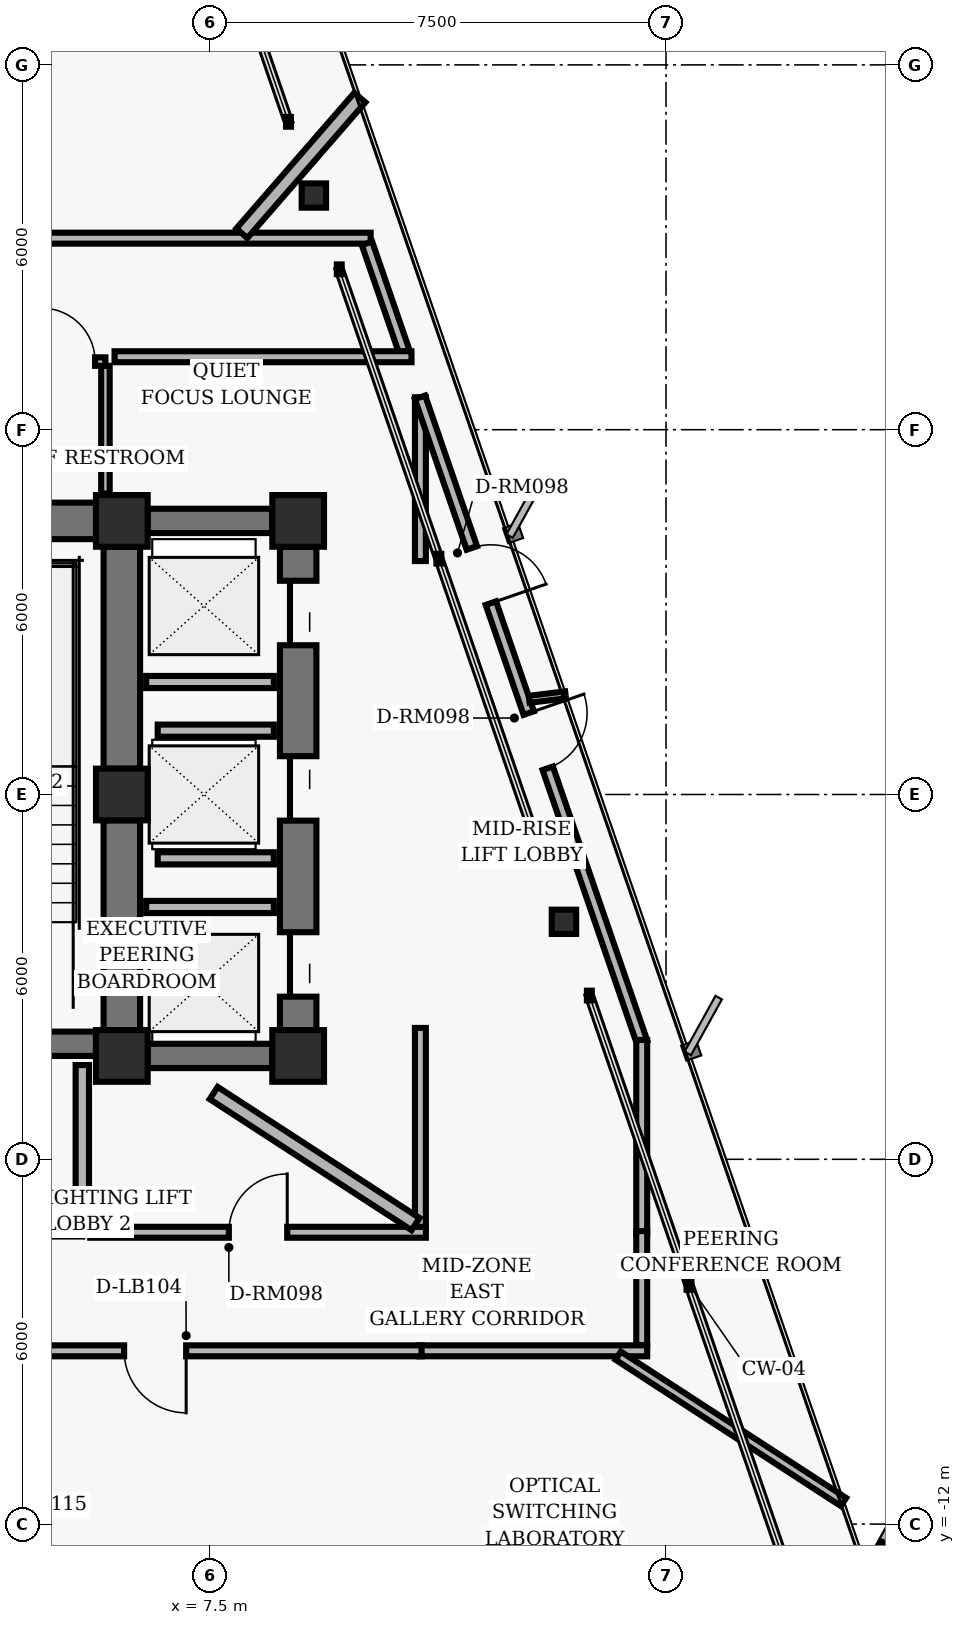
"""IFC4 building model, lengths in metres.
Left out: names, types, materials, properties, quantities, classifications, styles, units other than length and angle.
Written with IfcOpenShell. Run it as: python <this file> out.ifc"""

import sys

from ifc_helpers import new_model, si_unit, direction, frame, frame_2d, origin, origin_2d, place, context, subcontext, project, spatial, rectangle, hollow_rectangle, i_section, extrude, element, fill, save


model = new_model("IFC4")
c1 = context("Model", 3, precision=1e-05, world=origin(), true_north=direction((0.0, 1.0)))
c2 = subcontext(c1, "Body", "Model", "MODEL_VIEW")
j1 = project(units=[si_unit("LENGTHUNIT", "METRE"), si_unit("PLANEANGLEUNIT", "RADIAN")], contexts=[c1])
p1 = place(None, origin())
s1 = spatial("IfcSite", under=j1, at=p1, CompositionType="ELEMENT")
p2 = place(p1, origin())
s2 = spatial("IfcBuilding", under=s1, at=p2, CompositionType="ELEMENT")
p3 = place(p2, frame((0.0, 0.0, 156.32)))
s3 = spatial("IfcBuildingStorey", under=s2, at=p3, CompositionType="ELEMENT", Elevation=156.32)
for number, where, z_axis, x_axis in (
    (1, (6.05, 4.5, 0.0), (0.0, 0.0, 1.0), (1.0, 0.0, 0.0)),
    (2, (6.05, 0.0, 0.0), (0.0, 0.0, 1.0), (1.0, 0.0, 0.0)),
    (3, (6.05, -4.3, 0.0), (0.0, 0.0, 1.0), (1.0, 0.0, 0.0)),
    (4, (8.95, 4.5, 0.0), (0.0, 0.0, 1.0), (1.0, 0.0, 0.0)),
    (5, (8.95, -4.3, 0.0), (0.0, 0.0, 1.0), (1.0, 0.0, 0.0)),
):
    element("IfcColumn", number, at=place(p3, frame(where, z_axis=z_axis, x_axis=x_axis)), inside=s3, PredefinedType="COLUMN", context=c2, shape_type="SweptSolid", body=[
        extrude(hollow_rectangle(XDim=0.85, YDim=0.85, WallThickness=0.055, InnerFilletRadius=0.02, OuterFilletRadius=0.04, at=origin_2d()), origin(), (0.0, 0.0, 1.0), 3.04),
    ])
p4 = place(p3, frame((6.05, 0.425, 0.0), z_axis=(0.0, 0.0, 1.0), x_axis=(0.0, 1.0, 0.0)))
e6 = element("IfcWall", 6, at=p4, inside=s3, PredefinedType="SHEAR", context=c2, shape_type="SweptSolid", body=[
    extrude(rectangle(XDim=3.65, YDim=0.6, at=frame_2d((1.825, 0.0))), origin(), (0.0, 0.0, 1.0), 2.788),
])
p5 = place(p3, frame((6.05, -3.875, 0.0), z_axis=(0.0, 0.0, 1.0), x_axis=(0.0, 1.0, 0.0)))
e7 = element("IfcWall", 7, at=p5, inside=s3, PredefinedType="SHEAR", context=c2, shape_type="SweptSolid", body=[
    extrude(rectangle(XDim=3.45, YDim=0.6, at=frame_2d((1.725, 0.0))), origin(), (0.0, 0.0, 1.0), 2.788),
])
p6 = place(p3, frame((-5.625, -4.1, 0.0), z_axis=(0.0, 0.0, 1.0), x_axis=(1.0, 0.0, 0.0)))
e8 = element("IfcWall", 8, at=p6, inside=s3, PredefinedType="SHEAR", context=c2, shape_type="SweptSolid", body=[
    extrude(rectangle(XDim=11.25, YDim=0.4, at=frame_2d((5.625, 0.0))), origin(), (0.0, 0.0, 1.0), 2.788),
])
p7 = place(p6, frame((1.355, 0.0, 0.0)))
e9 = element("IfcOpeningElement", 9, at=p7, cuts=e8, PredefinedType="OPENING", context=c2, shape_type="SweptSolid", body=[
    extrude(rectangle(XDim=1.1, YDim=2.04, at=frame_2d((0.55, 1.02))), frame((0.0, 0.21, 0.0), z_axis=(0.0, -1.0, 0.0), x_axis=(1.0, 0.0, 0.0)), (0.0, 0.0, 1.0), 0.42),
])
p8 = place(p6, frame((8.795, 0.0, 0.0)))
e10 = element("IfcOpeningElement", 10, at=p8, cuts=e8, PredefinedType="OPENING", context=c2, shape_type="SweptSolid", body=[
    extrude(rectangle(XDim=1.1, YDim=2.04, at=frame_2d((0.55, 1.02))), frame((0.0, 0.21, 0.0), z_axis=(0.0, -1.0, 0.0), x_axis=(1.0, 0.0, 0.0)), (0.0, 0.0, 1.0), 0.42),
])
p9 = place(p6, frame((4.095, 0.0, 0.0)))
e11 = element("IfcOpeningElement", 11, at=p9, cuts=e8, PredefinedType="OPENING", context=c2, shape_type="SweptSolid", body=[
    extrude(rectangle(XDim=1.06, YDim=2.04, at=frame_2d((0.53, 1.02))), frame((0.0, 0.21, 0.0), z_axis=(0.0, -1.0, 0.0), x_axis=(1.0, 0.0, 0.0)), (0.0, 0.0, 1.0), 0.42),
])
p10 = place(p6, frame((6.095, 0.0, 0.0)))
e12 = element("IfcOpeningElement", 12, at=p10, cuts=e8, PredefinedType="OPENING", context=c2, shape_type="SweptSolid", body=[
    extrude(rectangle(XDim=1.06, YDim=2.04, at=frame_2d((0.53, 1.02))), frame((0.0, 0.21, 0.0), z_axis=(0.0, -1.0, 0.0), x_axis=(1.0, 0.0, 0.0)), (0.0, 0.0, 1.0), 0.42),
])
p11 = place(p3, frame((2.05, 4.5, 0.0), z_axis=(0.0, 0.0, 1.0), x_axis=(1.0, 0.0, 0.0)))
e13 = element("IfcWall", 13, at=p11, inside=s3, PredefinedType="SHEAR", context=c2, shape_type="SweptSolid", body=[
    extrude(rectangle(XDim=3.575, YDim=0.6, at=frame_2d((1.788, 0.0))), origin(), (0.0, 0.0, 1.0), 2.788),
])
p12 = place(p3, frame((8.95, -3.875, 0.0), z_axis=(0.0, 0.0, 1.0), x_axis=(0.0, 1.0, 0.0)))
e14 = element("IfcWall", 14, at=p12, inside=s3, PredefinedType="SHEAR", context=c2, shape_type="SweptSolid", body=[
    extrude(rectangle(XDim=7.95, YDim=0.6, at=frame_2d((3.975, 0.0))), origin(), (0.0, 0.0, 1.0), 2.788),
])
p13 = place(p12, frame((0.55, 0.0, 0.0)))
e15 = element("IfcOpeningElement", 15, at=p13, cuts=e14, PredefinedType="OPENING", context=c2, shape_type="SweptSolid", body=[
    extrude(rectangle(XDim=1.06, YDim=2.04, at=frame_2d((0.53, 1.02))), frame((0.0, 0.31, 0.0), z_axis=(0.0, -1.0, 0.0), x_axis=(1.0, 0.0, 0.0)), (0.0, 0.0, 1.0), 0.62),
])
p14 = place(p12, frame((3.445, 0.0, 0.0)))
e16 = element("IfcOpeningElement", 16, at=p14, cuts=e14, PredefinedType="OPENING", context=c2, shape_type="SweptSolid", body=[
    extrude(rectangle(XDim=1.06, YDim=2.04, at=frame_2d((0.53, 1.02))), frame((0.0, 0.31, 0.0), z_axis=(0.0, -1.0, 0.0), x_axis=(1.0, 0.0, 0.0)), (0.0, 0.0, 1.0), 0.62),
])
p15 = place(p12, frame((6.33, 0.0, 0.0)))
e17 = element("IfcOpeningElement", 17, at=p15, cuts=e14, PredefinedType="OPENING", context=c2, shape_type="SweptSolid", body=[
    extrude(rectangle(XDim=1.06, YDim=2.04, at=frame_2d((0.53, 1.02))), frame((0.0, 0.31, 0.0), z_axis=(0.0, -1.0, 0.0), x_axis=(1.0, 0.0, 0.0)), (0.0, 0.0, 1.0), 0.62),
])
for number, where, z_axis, x_axis in (
    (18, (6.475, 4.5, 0.0), (0.0, 0.0, 1.0), (1.0, 0.0, 0.0)),
    (19, (6.475, -4.3, 0.0), (0.0, 0.0, 1.0), (1.0, 0.0, 0.0)),
):
    element("IfcWall", number, at=place(p3, frame(where, z_axis=z_axis, x_axis=x_axis)), inside=s3, PredefinedType="SHEAR", context=c2, shape_type="SweptSolid", body=[
        extrude(rectangle(XDim=2.05, YDim=0.4, at=frame_2d((1.025, 0.0))), origin(), (0.0, 0.0, 1.0), 2.788),
    ])
for number, where, z_axis, x_axis in (
    (20, (13.321, -2.094, 0.0), (0.0, 0.0, 1.0), (1.0, 0.0, 0.0)),
    (21, (9.208, 9.851, 0.0), (0.0, 0.0, 1.0), (1.0, 0.0, 0.0)),
):
    element("IfcColumn", number, at=place(p3, frame(where, z_axis=z_axis, x_axis=x_axis)), inside=s3, PredefinedType="COLUMN", context=c2, shape_type="SweptSolid", body=[
        extrude(i_section(OverallWidth=0.401, OverallDepth=0.399, WebThickness=0.025, FlangeThickness=0.04, FilletRadius=0.018, at=origin_2d()), origin(), (0.0, 0.0, 1.0), 3.04),
    ])
p16 = place(p3, frame((5.4, -7.16, 0.0), z_axis=(0.0, 0.0, 1.0), x_axis=(0.0, 1.0, 0.0)))
e22 = element("IfcWall", 22, at=p16, inside=s3, PredefinedType="PARTITIONING", context=c2, shape_type="SweptSolid", body=[
    extrude(rectangle(XDim=2.71, YDim=0.22, at=frame_2d((1.355, 0.0))), origin(), (0.0, 0.0, 1.0), 2.763),
])
p17 = place(p3, frame((0.0, -7.16, 0.0), z_axis=(0.0, 0.0, 1.0), x_axis=(1.0, 0.0, 0.0)))
e23 = element("IfcWall", 23, at=p17, inside=s3, PredefinedType="PARTITIONING", context=c2, shape_type="SweptSolid", body=[
    extrude(rectangle(XDim=5.4, YDim=0.22, at=frame_2d((2.7, 0.0))), origin(), (0.0, 0.0, 1.0), 2.33),
])
p18 = place(p17, frame((2.05, 0.0, 0.0)))
e24 = element("IfcOpeningElement", 24, at=p18, cuts=e23, PredefinedType="OPENING", context=c2, shape_type="SweptSolid", body=[
    extrude(rectangle(XDim=1.12, YDim=2.02, at=frame_2d((0.56, 1.01))), frame((0.0, 0.12, 0.0), z_axis=(0.0, -1.0, 0.0), x_axis=(1.0, 0.0, 0.0)), (0.0, 0.0, 1.0), 0.24),
])
p19 = place(p3, frame((5.78, 4.95, 0.0), z_axis=(0.0, 0.0, 1.0), x_axis=(0.0, 1.0, 0.0)))
e25 = element("IfcWall", 25, at=p19, inside=s3, PredefinedType="PARTITIONING", context=c2, shape_type="SweptSolid", body=[
    extrude(rectangle(XDim=2.1, YDim=0.14, at=frame_2d((1.05, 0.0))), origin(), (0.0, 0.0, 1.0), 2.763),
])
p20 = place(p3, frame((4.56, 7.12, 0.0), z_axis=(0.0, 0.0, 1.0), x_axis=(1.0, 0.0, 0.0)))
e26 = element("IfcWall", 26, at=p20, inside=s3, PredefinedType="PARTITIONING", context=c2, shape_type="SweptSolid", body=[
    extrude(rectangle(XDim=1.22, YDim=0.14, at=frame_2d((0.61, 0.0))), origin(), (0.0, 0.0, 1.0), 2.763),
])
p21 = place(p20, frame((0.17, 0.0, 0.0)))
e27 = element("IfcOpeningElement", 27, at=p21, cuts=e26, PredefinedType="OPENING", context=c2, shape_type="SweptSolid", body=[
    extrude(rectangle(XDim=0.88, YDim=2.02, at=frame_2d((0.44, 1.01))), frame((0.0, 0.08, 0.0), z_axis=(0.0, -1.0, 0.0), x_axis=(1.0, 0.0, 0.0)), (0.0, 0.0, 1.0), 0.16),
])
for number, where, z_axis, x_axis in (
    (28, (6.45, -1.85, 0.0), (0.0, 0.0, 1.0), (1.0, 0.0, 0.0)),
    (29, (6.45, 1.85, 0.0), (0.0, 0.0, 1.0), (1.0, 0.0, 0.0)),
):
    element("IfcWall", number, at=place(p3, frame(where, z_axis=z_axis, x_axis=x_axis)), inside=s3, PredefinedType="PARTITIONING", context=c2, shape_type="SweptSolid", body=[
        extrude(rectangle(XDim=2.1, YDim=0.2, at=frame_2d((1.05, 0.0))), origin(), (0.0, 0.0, 1.0), 2.763),
    ])
for number, where, z_axis, x_axis in (
    (30, (6.64, -1.05, 0.0), (0.0, 0.0, 1.0), (1.0, 0.0, 0.0)),
    (31, (6.64, 1.05, 0.0), (0.0, 0.0, 1.0), (1.0, 0.0, 0.0)),
):
    element("IfcWall", number, at=place(p3, frame(where, z_axis=z_axis, x_axis=x_axis)), inside=s3, PredefinedType="PARTITIONING", context=c2, shape_type="SweptSolid", body=[
        extrude(rectangle(XDim=1.91, YDim=0.2, at=frame_2d((0.955, 0.0))), origin(), (0.0, 0.0, 1.0), 2.763),
    ])
p22 = place(p3, frame((-6.52, 9.15, 0.0), z_axis=(0.0, 0.0, 1.0), x_axis=(1.0, 0.0, 0.0)))
e32 = element("IfcWall", 32, at=p22, inside=s3, PredefinedType="PARTITIONING", context=c2, shape_type="SweptSolid", body=[
    extrude(rectangle(XDim=16.662, YDim=0.18, at=frame_2d((8.331, 0.0))), origin(), (0.0, 0.0, 1.0), 2.763),
])
p23 = place(p22, frame((9.985, 0.0, 0.0)))
e33 = element("IfcOpeningElement", 33, at=p23, cuts=e32, PredefinedType="OPENING", context=c2, shape_type="SweptSolid", body=[
    extrude(rectangle(XDim=0.96, YDim=2.02, at=frame_2d((0.48, 1.01))), frame((0.0, 0.1, 0.0), z_axis=(0.0, -1.0, 0.0), x_axis=(1.0, 0.0, 0.0)), (0.0, 0.0, 1.0), 0.2),
])
p24 = place(p22, frame((2.719, 0.0, 0.0)))
e34 = element("IfcOpeningElement", 34, at=p24, cuts=e32, PredefinedType="OPENING", context=c2, shape_type="SweptSolid", body=[
    extrude(rectangle(XDim=1.18, YDim=2.02, at=frame_2d((0.59, 1.01))), frame((0.0, 0.1, 0.0), z_axis=(0.0, -1.0, 0.0), x_axis=(1.0, 0.0, 0.0)), (0.0, 0.0, 1.0), 0.2),
])
p25 = place(p3, frame((10.082, 9.065, 0.0), z_axis=(0.0, 0.0, 1.0), x_axis=(0.325550958337, -0.945524496524, 0.0)))
e35 = element("IfcWall", 35, at=p25, inside=s3, PredefinedType="PARTITIONING", context=c2, shape_type="SweptSolid", body=[
    extrude(rectangle(XDim=1.882, YDim=0.18, at=frame_2d((0.941, 0.0))), origin(), (0.0, 0.0, 1.0), 2.763),
])
p26 = place(p3, frame((10.814, 7.2, 0.0), z_axis=(0.0, 0.0, 1.0), x_axis=(-1.0, 0.0, 0.0)))
e36 = element("IfcWall", 36, at=p26, inside=s3, PredefinedType="PARTITIONING", context=c2, shape_type="SweptSolid", body=[
    extrude(rectangle(XDim=4.884, YDim=0.18, at=frame_2d((2.442, 0.0))), origin(), (0.0, 0.0, 1.0), 2.763),
])
p27 = place(p3, frame((5.53, -7.2, 0.0), z_axis=(0.0, 0.0, 1.0), x_axis=(1.0, 0.0, 0.0)))
e37 = element("IfcWall", 37, at=p27, inside=s3, PredefinedType="PARTITIONING", context=c2, shape_type="SweptSolid", body=[
    extrude(rectangle(XDim=5.52, YDim=0.18, at=frame_2d((2.76, 0.0))), origin(), (0.0, 0.0, 1.0), 2.33),
])
p28 = place(p27, frame((2.28, 0.0, 0.0)))
e38 = element("IfcOpeningElement", 38, at=p28, cuts=e37, PredefinedType="OPENING", context=c2, shape_type="SweptSolid", body=[
    extrude(rectangle(XDim=0.96, YDim=2.02, at=frame_2d((0.48, 1.01))), frame((0.0, 0.1, 0.0), z_axis=(0.0, -1.0, 0.0), x_axis=(1.0, 0.0, 0.0)), (0.0, 0.0, 1.0), 0.2),
])
p29 = place(p3, frame((10.96, -7.11, 0.0), z_axis=(0.0, 0.0, 1.0), x_axis=(0.0, 1.0, 0.0)))
e39 = element("IfcWall", 39, at=p29, inside=s3, PredefinedType="PARTITIONING", context=c2, shape_type="SweptSolid", body=[
    extrude(rectangle(XDim=3.271, YDim=0.18, at=frame_2d((1.635, 0.0))), origin(), (0.0, 0.0, 1.0), 2.763),
])
p30 = place(p3, frame((10.96, 3.84, 0.0), z_axis=(0.0, 0.0, 1.0), x_axis=(0.0, 1.0, 0.0)))
e40 = element("IfcWall", 40, at=p30, inside=s3, PredefinedType="PARTITIONING", context=c2, shape_type="SweptSolid", body=[
    extrude(rectangle(XDim=2.694, YDim=0.18, at=frame_2d((1.347, 0.0))), origin(), (0.0, 0.0, 1.0), 2.33),
])
p31 = place(p3, frame((10.954, 6.533, 0.0), z_axis=(0.0, 0.0, 1.0), x_axis=(0.325553439946, -0.945523642084, 0.0)))
e41 = element("IfcWall", 41, at=p31, inside=s3, PredefinedType="PARTITIONING", context=c2, shape_type="SweptSolid", body=[
    extrude(rectangle(XDim=11.22, YDim=0.18, at=frame_2d((5.61, 0.0))), origin(), (0.0, 0.0, 1.0), 2.763),
])
p32 = place(p31, frame((5.493, 0.0, 0.0)))
e42 = element("IfcOpeningElement", 42, at=p32, cuts=e41, PredefinedType="OPENING", context=c2, shape_type="SweptSolid", body=[
    extrude(rectangle(XDim=0.96, YDim=2.02, at=frame_2d((0.48, 1.01))), frame((0.0, 0.1, 0.0), z_axis=(0.0, -1.0, 0.0), x_axis=(1.0, 0.0, 0.0)), (0.0, 0.0, 1.0), 0.2),
])
p33 = place(p31, frame((2.621, 0.0, 0.0)))
e43 = element("IfcOpeningElement", 43, at=p33, cuts=e41, PredefinedType="OPENING", context=c2, shape_type="SweptSolid", body=[
    extrude(rectangle(XDim=0.96, YDim=2.02, at=frame_2d((0.48, 1.01))), frame((0.0, 0.1, 0.0), z_axis=(0.0, -1.0, 0.0), x_axis=(1.0, 0.0, 0.0)), (0.0, 0.0, 1.0), 0.2),
])
p34 = place(p3, frame((14.6, -4.038, 0.0), z_axis=(0.0, 0.0, 1.0), x_axis=(0.0, -1.0, 0.0)))
e44 = element("IfcWall", 44, at=p34, inside=s3, PredefinedType="PARTITIONING", context=c2, shape_type="SweptSolid", body=[
    extrude(rectangle(XDim=3.182, YDim=0.18, at=frame_2d((1.591, 0.0))), origin(), (0.0, 0.0, 1.0), 2.763),
])
p35 = place(p3, frame((14.6, -7.18, 0.0), z_axis=(0.0, 0.0, 1.0), x_axis=(0.0, -1.0, 0.0)))
e45 = element("IfcWall", 45, at=p35, inside=s3, PredefinedType="PARTITIONING", context=c2, shape_type="SweptSolid", body=[
    extrude(rectangle(XDim=1.88, YDim=0.18, at=frame_2d((0.94, 0.0))), origin(), (0.0, 0.0, 1.0), 2.763),
])
p36 = place(p3, frame((14.69, -9.15, 0.0), z_axis=(0.0, 0.0, 1.0), x_axis=(-1.0, 0.0, 0.0)))
e46 = element("IfcWall", 46, at=p36, inside=s3, PredefinedType="PARTITIONING", context=c2, shape_type="SweptSolid", body=[
    extrude(rectangle(XDim=3.75, YDim=0.18, at=frame_2d((1.875, 0.0))), origin(), (0.0, 0.0, 1.0), 2.763),
])
p37 = place(p3, frame((10.98, -9.15, 0.0), z_axis=(0.0, 0.0, 1.0), x_axis=(-1.0, 0.0, 0.0)))
e47 = element("IfcWall", 47, at=p37, inside=s3, PredefinedType="PARTITIONING", context=c2, shape_type="SweptSolid", body=[
    extrude(rectangle(XDim=17.5, YDim=0.18, at=frame_2d((8.75, 0.0))), origin(), (0.0, 0.0, 1.0), 2.33),
])
p38 = place(p37, frame((11.417, 0.0, 0.0)))
e48 = element("IfcOpeningElement", 48, at=p38, cuts=e47, PredefinedType="OPENING", context=c2, shape_type="SweptSolid", body=[
    extrude(rectangle(XDim=0.96, YDim=2.02, at=frame_2d((0.48, 1.01))), frame((0.0, 0.1, 0.0), z_axis=(0.0, -1.0, 0.0), x_axis=(1.0, 0.0, 0.0)), (0.0, 0.0, 1.0), 0.2),
])
p39 = place(p37, frame((3.872, 0.0, 0.0)))
e49 = element("IfcOpeningElement", 49, at=p39, cuts=e47, PredefinedType="OPENING", context=c2, shape_type="SweptSolid", body=[
    extrude(rectangle(XDim=1.02, YDim=2.02, at=frame_2d((0.51, 1.01))), frame((0.0, 0.1, 0.0), z_axis=(0.0, -1.0, 0.0), x_axis=(1.0, 0.0, 0.0)), (0.0, 0.0, 1.0), 0.2),
])
p40 = place(p3, frame((7.561, -4.91, 0.0), z_axis=(0.0, 0.0, 1.0), x_axis=(0.838633829817, -0.544695602595, 0.0)))
e50 = element("IfcWall", 50, at=p40, inside=s3, PredefinedType="PARTITIONING", context=c2, shape_type="SweptSolid", body=[
    extrude(rectangle(XDim=3.958, YDim=0.24, at=frame_2d((1.979, 0.0))), origin(), (0.0, 0.0, 1.0), 2.132),
])
p41 = place(p3, frame((14.213, -9.23, 0.0), z_axis=(0.0, 0.0, 1.0), x_axis=(0.83867205822, -0.544636740187, 0.0)))
e51 = element("IfcWall", 51, at=p41, inside=s3, PredefinedType="PARTITIONING", context=c2, shape_type="SweptSolid", body=[
    extrude(rectangle(XDim=4.418, YDim=0.16, at=frame_2d((2.209, 0.0))), origin(), (0.0, 0.0, 1.0), 2.763),
])
p42 = place(p3, frame((12.749, 1.565, 0.0), z_axis=(0.0, 0.0, 1.0), x_axis=(0.992500437265, 0.122241081588, 0.0)))
e52 = element("IfcWall", 52, at=p42, inside=s3, PredefinedType="MOVABLE", context=c2, shape_type="SweptSolid", body=[
    extrude(rectangle(XDim=0.603, YDim=0.115, at=frame_2d((0.302, 0.0))), origin(), (0.0, 0.0, 1.0), 2.763),
])
p43 = place(p3, frame((8.023, 9.23, 0.0), z_axis=(0.0, 0.0, 1.0), x_axis=(0.656082692906, 0.754689008844, 0.0)))
e53 = element("IfcWall", 53, at=p43, inside=s3, PredefinedType="PARTITIONING", context=c2, shape_type="SweptSolid", body=[
    extrude(rectangle(XDim=2.959, YDim=0.24, at=frame_2d((1.479, 0.0))), origin(), (0.0, 0.0, 1.0), 2.763),
])
p44 = place(p21, origin())
e54 = element("IfcDoor", 54, at=p44, inside=s3, OperationType="SINGLE_SWING_LEFT", PredefinedType="DOOR", context=c2, shape_type="SweptSolid", body=[
    extrude(rectangle(XDim=0.88, YDim=2.02, at=frame_2d((0.44, 1.01))), frame((0.0, 0.025, 0.0), z_axis=(0.0, -1.0, 0.0), x_axis=(1.0, 0.0, 0.0)), (0.0, 0.0, 1.0), 0.05),
])
fill(e27, e54)
p45 = place(p13, origin())
e55 = element("IfcDoor", 55, at=p45, inside=s3, OperationType="SLIDING_TO_LEFT", PredefinedType="DOOR", context=c2, shape_type="SweptSolid", body=[
    extrude(rectangle(XDim=1.06, YDim=2.04, at=frame_2d((0.53, 1.02))), frame((0.0, 0.025, 0.0), z_axis=(0.0, -1.0, 0.0), x_axis=(1.0, 0.0, 0.0)), (0.0, 0.0, 1.0), 0.05),
])
fill(e15, e55)
p46 = place(p14, origin())
e56 = element("IfcDoor", 56, at=p46, inside=s3, OperationType="SLIDING_TO_RIGHT", PredefinedType="DOOR", context=c2, shape_type="SweptSolid", body=[
    extrude(rectangle(XDim=1.06, YDim=2.04, at=frame_2d((0.53, 1.02))), frame((0.0, 0.025, 0.0), z_axis=(0.0, -1.0, 0.0), x_axis=(1.0, 0.0, 0.0)), (0.0, 0.0, 1.0), 0.05),
])
fill(e16, e56)
p47 = place(p15, origin())
e57 = element("IfcDoor", 57, at=p47, inside=s3, OperationType="SLIDING_TO_LEFT", PredefinedType="DOOR", context=c2, shape_type="SweptSolid", body=[
    extrude(rectangle(XDim=1.06, YDim=2.04, at=frame_2d((0.53, 1.02))), frame((0.0, 0.025, 0.0), z_axis=(0.0, -1.0, 0.0), x_axis=(1.0, 0.0, 0.0)), (0.0, 0.0, 1.0), 0.05),
])
fill(e17, e57)
p48 = place(p39, origin())
e58 = element("IfcDoor", 58, at=p48, inside=s3, OperationType="SINGLE_SWING_LEFT", PredefinedType="DOOR", context=c2, shape_type="SweptSolid", body=[
    extrude(rectangle(XDim=1.02, YDim=2.02, at=frame_2d((0.51, 1.01))), frame((0.0, 0.025, 0.0), z_axis=(0.0, -1.0, 0.0), x_axis=(1.0, 0.0, 0.0)), (0.0, 0.0, 1.0), 0.05),
])
fill(e49, e58)
p49 = place(p28, origin())
e59 = element("IfcDoor", 59, at=p49, inside=s3, OperationType="SINGLE_SWING_RIGHT", PredefinedType="DOOR", context=c2, shape_type="SweptSolid", body=[
    extrude(rectangle(XDim=0.96, YDim=2.02, at=frame_2d((0.48, 1.01))), frame((0.0, 0.025, 0.0), z_axis=(0.0, -1.0, 0.0), x_axis=(1.0, 0.0, 0.0)), (0.0, 0.0, 1.0), 0.05),
])
fill(e38, e59)
p50 = place(p32, origin())
e60 = element("IfcDoor", 60, at=p50, inside=s3, OperationType="SINGLE_SWING_LEFT", PredefinedType="DOOR", context=c2, shape_type="SweptSolid", body=[
    extrude(rectangle(XDim=0.96, YDim=2.02, at=frame_2d((0.48, 1.01))), frame((0.0, 0.025, 0.0), z_axis=(0.0, -1.0, 0.0), x_axis=(1.0, 0.0, 0.0)), (0.0, 0.0, 1.0), 0.05),
])
fill(e42, e60)
p51 = place(p33, origin())
e61 = element("IfcDoor", 61, at=p51, inside=s3, OperationType="SINGLE_SWING_RIGHT", PredefinedType="DOOR", context=c2, shape_type="SweptSolid", body=[
    extrude(rectangle(XDim=0.96, YDim=2.02, at=frame_2d((0.48, 1.01))), frame((0.0, 0.025, 0.0), z_axis=(0.0, -1.0, 0.0), x_axis=(1.0, 0.0, 0.0)), (0.0, 0.0, 1.0), 0.05),
])
fill(e43, e61)
save(model, sys.argv[1])
